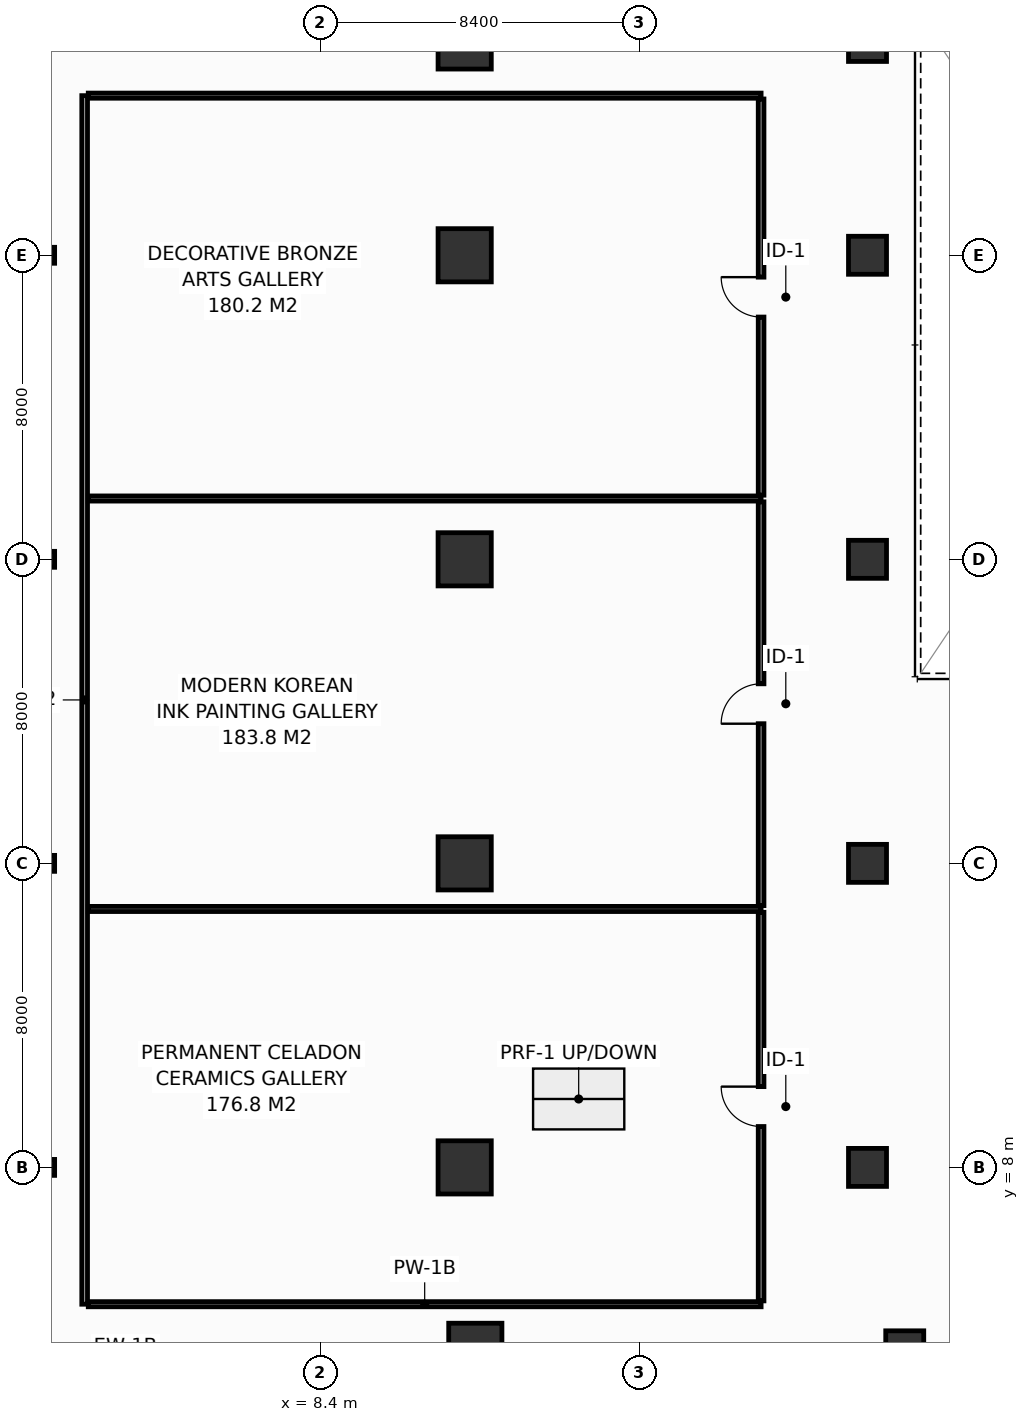
"""IFC4 building model, lengths in metres.
Left out: names, types, materials, properties, quantities, classifications, styles, units other than length and angle.
Written with IfcOpenShell. Run it as: python <this file> out.ifc"""

import sys

from ifc_helpers import new_model, si_unit, direction, frame, frame_2d, origin, origin_2d, place, context, subcontext, project, spatial, rectangle, hollow_rectangle, i_section, extrude, element, fill, save


model = new_model("IFC4")
c1 = context("Model", 3, precision=1e-05, world=origin(), true_north=direction((0.0, 1.0)))
c2 = subcontext(c1, "Body", "Model", "MODEL_VIEW")
j1 = project(units=[si_unit("LENGTHUNIT", "METRE"), si_unit("PLANEANGLEUNIT", "RADIAN")], contexts=[c1])
p1 = place(None, origin())
s1 = spatial("IfcSite", under=j1, at=p1, CompositionType="ELEMENT")
p2 = place(p1, origin())
s2 = spatial("IfcBuilding", under=s1, at=p2, CompositionType="ELEMENT")
p3 = place(p2, frame((0.0, 0.0, 16.8)))
s3 = spatial("IfcBuildingStorey", under=s2, at=p3, CompositionType="ELEMENT", Elevation=16.8)
p4 = place(p3, frame((12.48, 3.2, 0.0), z_axis=(0.0, 0.0, 1.0), x_axis=(1.0, 0.0, 0.0)))
e1 = element("IfcColumn", 1, at=p4, inside=s3, PredefinedType="COLUMN", context=c2, shape_type="SweptSolid", body=[
    extrude(hollow_rectangle(XDim=1.4, YDim=1.4, WallThickness=0.065, at=origin_2d()), origin(), (0.0, 0.0, 1.0), 5.4),
])
p5 = place(p3, frame((23.78, 3.2, 0.0), z_axis=(0.0, 0.0, 1.0), x_axis=(1.0, 0.0, 0.0)))
e2 = element("IfcColumn", 2, at=p5, inside=s3, PredefinedType="COLUMN", context=c2, shape_type="SweptSolid", body=[
    extrude(hollow_rectangle(XDim=1.0, YDim=1.0, WallThickness=0.045, at=origin_2d()), origin(), (0.0, 0.0, 1.0), 5.4),
])
p6 = place(p3, frame((12.2, 8.0, 0.0), z_axis=(0.0, 0.0, 1.0), x_axis=(1.0, 0.0, 0.0)))
e3 = element("IfcColumn", 3, at=p6, inside=s3, PredefinedType="COLUMN", context=c2, shape_type="SweptSolid", body=[
    extrude(hollow_rectangle(XDim=1.4, YDim=1.4, WallThickness=0.065, at=origin_2d()), origin(), (0.0, 0.0, 1.0), 5.4),
])
p7 = place(p3, frame((22.8, 8.0, 0.0), z_axis=(0.0, 0.0, 1.0), x_axis=(1.0, 0.0, 0.0)))
e4 = element("IfcColumn", 4, at=p7, inside=s3, PredefinedType="COLUMN", context=c2, shape_type="SweptSolid", body=[
    extrude(hollow_rectangle(XDim=1.0, YDim=1.0, WallThickness=0.045, at=origin_2d()), origin(), (0.0, 0.0, 1.0), 5.4),
])
p8 = place(p3, frame((12.2, 16.0, 0.0), z_axis=(0.0, 0.0, 1.0), x_axis=(1.0, 0.0, 0.0)))
e5 = element("IfcColumn", 5, at=p8, inside=s3, PredefinedType="COLUMN", context=c2, shape_type="SweptSolid", body=[
    extrude(hollow_rectangle(XDim=1.4, YDim=1.4, WallThickness=0.065, at=origin_2d()), origin(), (0.0, 0.0, 1.0), 5.4),
])
p9 = place(p3, frame((22.8, 16.0, 0.0), z_axis=(0.0, 0.0, 1.0), x_axis=(1.0, 0.0, 0.0)))
e6 = element("IfcColumn", 6, at=p9, inside=s3, PredefinedType="COLUMN", context=c2, shape_type="SweptSolid", body=[
    extrude(hollow_rectangle(XDim=1.0, YDim=1.0, WallThickness=0.045, at=origin_2d()), origin(), (0.0, 0.0, 1.0), 5.4),
])
p10 = place(p3, frame((12.2, 24.0, 0.0), z_axis=(0.0, 0.0, 1.0), x_axis=(1.0, 0.0, 0.0)))
e7 = element("IfcColumn", 7, at=p10, inside=s3, PredefinedType="COLUMN", context=c2, shape_type="SweptSolid", body=[
    extrude(hollow_rectangle(XDim=1.4, YDim=1.4, WallThickness=0.065, at=origin_2d()), origin(), (0.0, 0.0, 1.0), 5.4),
])
p11 = place(p3, frame((22.8, 24.0, 0.0), z_axis=(0.0, 0.0, 1.0), x_axis=(1.0, 0.0, 0.0)))
e8 = element("IfcColumn", 8, at=p11, inside=s3, PredefinedType="COLUMN", context=c2, shape_type="SweptSolid", body=[
    extrude(hollow_rectangle(XDim=1.0, YDim=1.0, WallThickness=0.045, at=origin_2d()), origin(), (0.0, 0.0, 1.0), 5.4),
])
p12 = place(p3, frame((12.2, 32.0, 0.0), z_axis=(0.0, 0.0, 1.0), x_axis=(1.0, 0.0, 0.0)))
e9 = element("IfcColumn", 9, at=p12, inside=s3, PredefinedType="COLUMN", context=c2, shape_type="SweptSolid", body=[
    extrude(hollow_rectangle(XDim=1.4, YDim=1.4, WallThickness=0.065, at=origin_2d()), origin(), (0.0, 0.0, 1.0), 5.4),
])
p13 = place(p3, frame((22.8, 32.0, 0.0), z_axis=(0.0, 0.0, 1.0), x_axis=(1.0, 0.0, 0.0)))
e10 = element("IfcColumn", 10, at=p13, inside=s3, PredefinedType="COLUMN", context=c2, shape_type="SweptSolid", body=[
    extrude(hollow_rectangle(XDim=1.0, YDim=1.0, WallThickness=0.045, at=origin_2d()), origin(), (0.0, 0.0, 1.0), 5.4),
])
p14 = place(p3, frame((12.2, 37.6, 0.0), z_axis=(0.0, 0.0, 1.0), x_axis=(1.0, 0.0, 0.0)))
e11 = element("IfcColumn", 11, at=p14, inside=s3, PredefinedType="COLUMN", context=c2, shape_type="SweptSolid", body=[
    extrude(hollow_rectangle(XDim=1.4, YDim=1.4, WallThickness=0.065, at=origin_2d()), origin(), (0.0, 0.0, 1.0), 5.4),
])
p15 = place(p3, frame((22.8, 37.6, 0.0), z_axis=(0.0, 0.0, 1.0), x_axis=(1.0, 0.0, 0.0)))
e12 = element("IfcColumn", 12, at=p15, inside=s3, PredefinedType="COLUMN", context=c2, shape_type="SweptSolid", body=[
    extrude(hollow_rectangle(XDim=1.0, YDim=1.0, WallThickness=0.045, at=origin_2d()), origin(), (0.0, 0.0, 1.0), 5.4),
])
for number, where, z_axis, x_axis in (
    (13, (1.2, 8.0, 0.0), (0.0, 0.0, 1.0), (1.0, 0.0, 0.0)),
    (14, (1.2, 16.0, 0.0), (0.0, 0.0, 1.0), (1.0, 0.0, 0.0)),
    (15, (1.2, 24.0, 0.0), (0.0, 0.0, 1.0), (1.0, 0.0, 0.0)),
    (16, (1.2, 32.0, 0.0), (0.0, 0.0, 1.0), (1.0, 0.0, 0.0)),
):
    element("IfcColumn", number, at=place(p3, frame(where, z_axis=z_axis, x_axis=x_axis)), inside=s3, PredefinedType="COLUMN", context=c2, shape_type="SweptSolid", body=[
        extrude(i_section(OverallWidth=0.42, OverallDepth=0.42, WebThickness=0.02, FlangeThickness=0.035, FilletRadius=0.022, at=origin_2d()), origin(), (0.0, 0.0, 1.0), 5.4),
    ])
p16 = place(p3, frame((2.2, 4.4, 0.0), z_axis=(0.0, 0.0, 1.0), x_axis=(0.0, 1.0, 0.0)))
e17 = element("IfcWall", 17, at=p16, inside=s3, PredefinedType="PARTITIONING", context=c2, shape_type="SweptSolid", body=[
    extrude(rectangle(XDim=31.8, YDim=0.15, at=frame_2d((15.9, 0.0))), origin(), (0.0, 0.0, 1.0), 4.185),
])
for number, where, z_axis, x_axis in (
    (18, (2.295, 4.4, 0.0), (0.0, 0.0, 1.0), (1.0, 0.0, 0.0)),
    (19, (2.295, 14.8, 0.0), (0.0, 0.0, 1.0), (1.0, 0.0, 0.0)),
    (20, (2.295, 25.6, 0.0), (0.0, 0.0, 1.0), (1.0, 0.0, 0.0)),
    (21, (2.295, 36.2, 0.0), (0.0, 0.0, 1.0), (1.0, 0.0, 0.0)),
):
    element("IfcWall", number, at=place(p3, frame(where, z_axis=z_axis, x_axis=x_axis)), inside=s3, PredefinedType="PARTITIONING", context=c2, shape_type="SweptSolid", body=[
        extrude(rectangle(XDim=17.705, YDim=0.135, at=frame_2d((8.853, 0.0))), origin(), (0.0, 0.0, 1.0), 4.185),
    ])
p17 = place(p3, frame((20.0, 4.488, 0.0), z_axis=(0.0, 0.0, 1.0), x_axis=(0.0, 1.0, 0.0)))
e22 = element("IfcWall", 22, at=p17, inside=s3, PredefinedType="PARTITIONING", context=c2, shape_type="SweptSolid", body=[
    extrude(rectangle(XDim=10.225, YDim=0.15, at=frame_2d((5.112, 0.0))), origin(), (0.0, 0.0, 1.0), 4.185),
])
p18 = place(p17, frame((4.588, 0.0, 0.0)))
e23 = element("IfcOpeningElement", 23, at=p18, cuts=e22, PredefinedType="OPENING", context=c2, shape_type="SweptSolid", body=[
    extrude(rectangle(XDim=1.05, YDim=2.15, at=frame_2d((0.525, 1.075))), frame((0.0, 0.085, 0.0), z_axis=(0.0, -1.0, 0.0), x_axis=(1.0, 0.0, 0.0)), (0.0, 0.0, 1.0), 0.17),
])
p19 = place(p3, frame((20.0, 14.887, 0.0), z_axis=(0.0, 0.0, 1.0), x_axis=(0.0, 1.0, 0.0)))
e24 = element("IfcWall", 24, at=p19, inside=s3, PredefinedType="PARTITIONING", context=c2, shape_type="SweptSolid", body=[
    extrude(rectangle(XDim=10.625, YDim=0.15, at=frame_2d((5.312, 0.0))), origin(), (0.0, 0.0, 1.0), 4.185),
])
p20 = place(p19, frame((4.787, 0.0, 0.0)))
e25 = element("IfcOpeningElement", 25, at=p20, cuts=e24, PredefinedType="OPENING", context=c2, shape_type="SweptSolid", body=[
    extrude(rectangle(XDim=1.05, YDim=2.15, at=frame_2d((0.525, 1.075))), frame((0.0, 0.085, 0.0), z_axis=(0.0, -1.0, 0.0), x_axis=(1.0, 0.0, 0.0)), (0.0, 0.0, 1.0), 0.17),
])
p21 = place(p3, frame((20.0, 25.688, 0.0), z_axis=(0.0, 0.0, 1.0), x_axis=(0.0, 1.0, 0.0)))
e26 = element("IfcWall", 26, at=p21, inside=s3, PredefinedType="PARTITIONING", context=c2, shape_type="SweptSolid", body=[
    extrude(rectangle(XDim=10.425, YDim=0.15, at=frame_2d((5.212, 0.0))), origin(), (0.0, 0.0, 1.0), 4.185),
])
p22 = place(p21, frame((4.687, 0.0, 0.0)))
e27 = element("IfcOpeningElement", 27, at=p22, cuts=e26, PredefinedType="OPENING", context=c2, shape_type="SweptSolid", body=[
    extrude(rectangle(XDim=1.05, YDim=2.15, at=frame_2d((0.525, 1.075))), frame((0.0, 0.085, 0.0), z_axis=(0.0, -1.0, 0.0), x_axis=(1.0, 0.0, 0.0)), (0.0, 0.0, 1.0), 0.17),
])
p23 = place(p18, origin())
e28 = element("IfcDoor", 28, at=p23, inside=s3, OperationType="SINGLE_SWING_RIGHT", PredefinedType="DOOR", context=c2, shape_type="SweptSolid", body=[
    extrude(rectangle(XDim=1.05, YDim=2.15, at=frame_2d((0.525, 1.075))), frame((0.0, 0.025, 0.0), z_axis=(0.0, -1.0, 0.0), x_axis=(1.0, 0.0, 0.0)), (0.0, 0.0, 1.0), 0.05),
])
fill(e23, e28)
p24 = place(p20, origin())
e29 = element("IfcDoor", 29, at=p24, inside=s3, OperationType="SINGLE_SWING_LEFT", PredefinedType="DOOR", context=c2, shape_type="SweptSolid", body=[
    extrude(rectangle(XDim=1.05, YDim=2.15, at=frame_2d((0.525, 1.075))), frame((0.0, 0.025, 0.0), z_axis=(0.0, -1.0, 0.0), x_axis=(1.0, 0.0, 0.0)), (0.0, 0.0, 1.0), 0.05),
])
fill(e25, e29)
p25 = place(p22, origin())
e30 = element("IfcDoor", 30, at=p25, inside=s3, OperationType="SINGLE_SWING_RIGHT", PredefinedType="DOOR", context=c2, shape_type="SweptSolid", body=[
    extrude(rectangle(XDim=1.05, YDim=2.15, at=frame_2d((0.525, 1.075))), frame((0.0, 0.025, 0.0), z_axis=(0.0, -1.0, 0.0), x_axis=(1.0, 0.0, 0.0)), (0.0, 0.0, 1.0), 0.05),
])
fill(e27, e30)
save(model, sys.argv[1])
